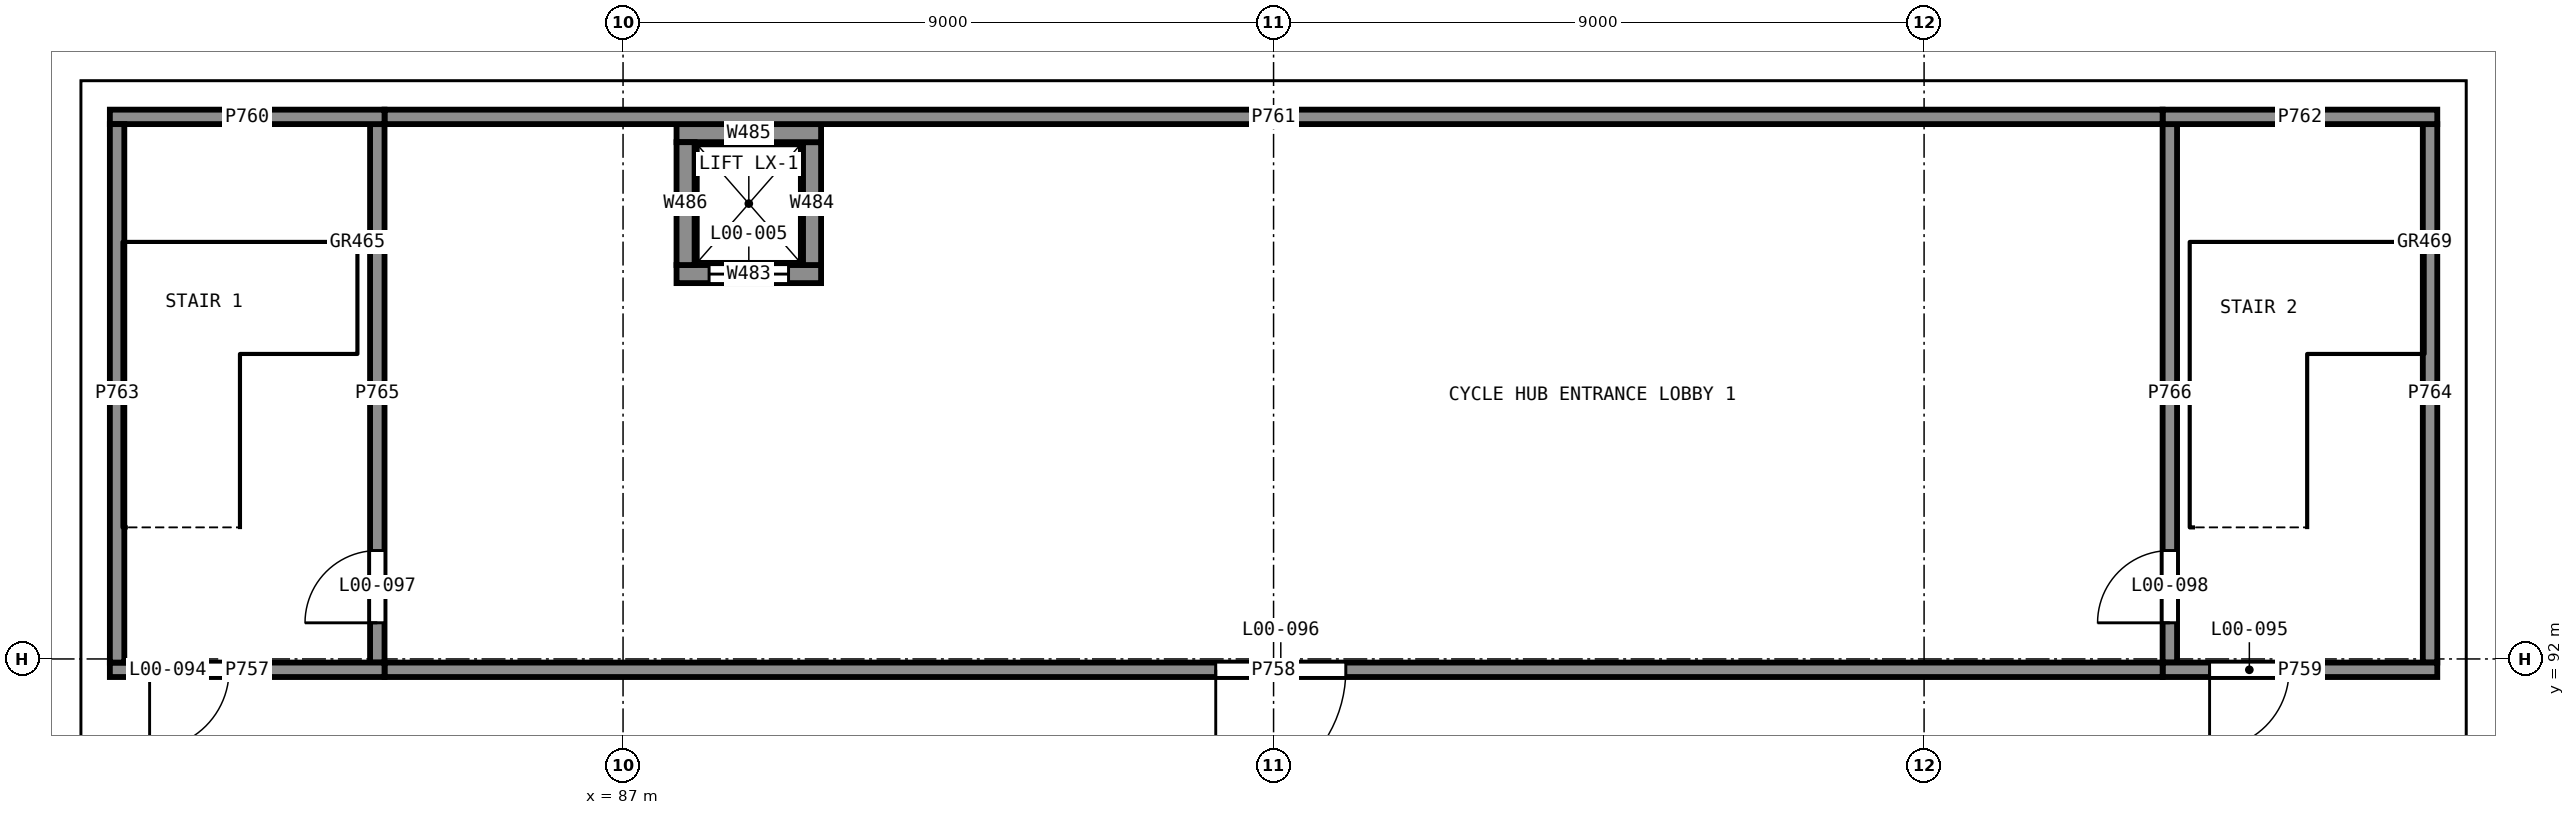
"""IFC4 building model, lengths in metres.
Left out: names, types, materials, properties, quantities, classifications, styles, units other than length and angle.
Written with IfcOpenShell. Run it as: python <this file> out.ifc"""

import sys

from ifc_helpers import new_model, si_unit, direction, frame, frame_2d, origin, place, context, subcontext, project, spatial, rectangle, extrude, element, fill, save


model = new_model("IFC4")
c1 = context("Model", 3, precision=1e-05, world=origin(), true_north=direction((0.0, 1.0)))
c2 = subcontext(c1, "Body", "Model", "MODEL_VIEW")
j1 = project(units=[si_unit("LENGTHUNIT", "METRE"), si_unit("PLANEANGLEUNIT", "RADIAN")], contexts=[c1])
p1 = place(None, origin())
s1 = spatial("IfcSite", under=j1, at=p1, CompositionType="ELEMENT")
p2 = place(p1, origin())
s2 = spatial("IfcBuilding", under=s1, at=p2, CompositionType="ELEMENT")
p3 = place(p2, origin())
s3 = spatial("IfcBuildingStorey", under=s2, at=p3, CompositionType="ELEMENT", Elevation=0.0)
p4 = place(p3, frame((87.74, 97.325, 0.0), z_axis=(0.0, 0.0, 1.0), x_axis=(1.0, 0.0, 0.0)))
e1 = element("IfcWall", 1, at=p4, inside=s3, PredefinedType="SHEAR", context=c2, shape_type="SweptSolid", body=[
    extrude(rectangle(XDim=2.0, YDim=0.25, at=frame_2d((1.0, 0.0))), origin(), (0.0, 0.0, 1.0), 3.8),
])
p5 = place(p4, frame((0.45, 0.0, 0.0)))
e2 = element("IfcOpeningElement", 2, at=p5, cuts=e1, PredefinedType="OPENING", context=c2, shape_type="SweptSolid", body=[
    extrude(rectangle(XDim=1.1, YDim=2.1, at=frame_2d((0.55, 1.05))), frame((0.0, 0.135, 0.0), z_axis=(0.0, -1.0, 0.0), x_axis=(1.0, 0.0, 0.0)), (0.0, 0.0, 1.0), 0.27),
])
p6 = place(p3, frame((89.615, 97.45, 0.0), z_axis=(0.0, 0.0, 1.0), x_axis=(0.0, 1.0, 0.0)))
e3 = element("IfcWall", 3, at=p6, inside=s3, PredefinedType="SHEAR", context=c2, shape_type="SweptSolid", body=[
    extrude(rectangle(XDim=1.7, YDim=0.25, at=frame_2d((0.85, 0.0))), origin(), (0.0, 0.0, 1.0), 3.8),
])
p7 = place(p3, frame((89.74, 99.275, 0.0), z_axis=(0.0, 0.0, 1.0), x_axis=(-1.0, 0.0, 0.0)))
e4 = element("IfcWall", 4, at=p7, inside=s3, PredefinedType="SHEAR", context=c2, shape_type="SweptSolid", body=[
    extrude(rectangle(XDim=2.0, YDim=0.25, at=frame_2d((1.0, 0.0))), origin(), (0.0, 0.0, 1.0), 3.8),
])
p8 = place(p3, frame((87.865, 99.15, 0.0), z_axis=(0.0, 0.0, 1.0), x_axis=(0.0, -1.0, 0.0)))
e5 = element("IfcWall", 5, at=p8, inside=s3, PredefinedType="SHEAR", context=c2, shape_type="SweptSolid", body=[
    extrude(rectangle(XDim=1.7, YDim=0.25, at=frame_2d((0.85, 0.0))), origin(), (0.0, 0.0, 1.0), 3.8),
])
p9 = place(p3, frame((79.9, 91.85, -0.15), z_axis=(0.0, 0.0, 1.0), x_axis=(1.0, 0.0, 0.0)))
e6 = element("IfcWall", 6, at=p9, inside=s3, PredefinedType="SOLIDWALL", context=c2, shape_type="SweptSolid", body=[
    extrude(rectangle(XDim=3.8, YDim=0.2, at=frame_2d((1.9, 0.0))), origin(), (0.0, 0.0, 1.0), 3.95),
])
p10 = place(p9, frame((0.55, 0.0, 0.15)))
e7 = element("IfcOpeningElement", 7, at=p10, cuts=e6, PredefinedType="OPENING", context=c2, shape_type="SweptSolid", body=[
    extrude(rectangle(XDim=1.1, YDim=2.1, at=frame_2d((0.55, 1.05))), frame((0.0, 0.11, 0.0), z_axis=(0.0, -1.0, 0.0), x_axis=(1.0, 0.0, 0.0)), (0.0, 0.0, 1.0), 0.22),
])
p11 = place(p3, frame((83.7, 91.85, -0.15), z_axis=(0.0, 0.0, 1.0), x_axis=(1.0, 0.0, 0.0)))
e8 = element("IfcWall", 8, at=p11, inside=s3, PredefinedType="SOLIDWALL", context=c2, shape_type="SweptSolid", body=[
    extrude(rectangle(XDim=24.6, YDim=0.2, at=frame_2d((12.3, 0.0))), origin(), (0.0, 0.0, 1.0), 3.95),
])
p12 = place(p11, frame((11.5, 0.0, 0.15)))
e9 = element("IfcOpeningElement", 9, at=p12, cuts=e8, PredefinedType="OPENING", context=c2, shape_type="SweptSolid", body=[
    extrude(rectangle(XDim=1.8, YDim=2.1, at=frame_2d((0.9, 1.05))), frame((0.0, 0.11, 0.0), z_axis=(0.0, -1.0, 0.0), x_axis=(1.0, 0.0, 0.0)), (0.0, 0.0, 1.0), 0.22),
])
p13 = place(p3, frame((108.3, 91.85, -0.15), z_axis=(0.0, 0.0, 1.0), x_axis=(1.0, 0.0, 0.0)))
e10 = element("IfcWall", 10, at=p13, inside=s3, PredefinedType="SOLIDWALL", context=c2, shape_type="SweptSolid", body=[
    extrude(rectangle(XDim=3.8, YDim=0.2, at=frame_2d((1.9, 0.0))), origin(), (0.0, 0.0, 1.0), 3.95),
])
p14 = place(p13, frame((0.65, 0.0, 0.15)))
e11 = element("IfcOpeningElement", 11, at=p14, cuts=e10, PredefinedType="OPENING", context=c2, shape_type="SweptSolid", body=[
    extrude(rectangle(XDim=1.1, YDim=2.1, at=frame_2d((0.55, 1.05))), frame((0.0, 0.11, 0.0), z_axis=(0.0, -1.0, 0.0), x_axis=(1.0, 0.0, 0.0)), (0.0, 0.0, 1.0), 0.22),
])
p15 = place(p3, frame((79.9, 99.5, -0.15), z_axis=(0.0, 0.0, 1.0), x_axis=(1.0, 0.0, 0.0)))
e12 = element("IfcWall", 12, at=p15, inside=s3, PredefinedType="SOLIDWALL", context=c2, shape_type="SweptSolid", body=[
    extrude(rectangle(XDim=3.8, YDim=0.2, at=frame_2d((1.9, 0.0))), origin(), (0.0, 0.0, 1.0), 3.95),
])
p16 = place(p3, frame((83.7, 99.5, -0.15), z_axis=(0.0, 0.0, 1.0), x_axis=(1.0, 0.0, 0.0)))
e13 = element("IfcWall", 13, at=p16, inside=s3, PredefinedType="SOLIDWALL", context=c2, shape_type="SweptSolid", body=[
    extrude(rectangle(XDim=24.6, YDim=0.2, at=frame_2d((12.3, 0.0))), origin(), (0.0, 0.0, 1.0), 3.95),
])
p17 = place(p3, frame((108.3, 99.5, -0.15), z_axis=(0.0, 0.0, 1.0), x_axis=(1.0, 0.0, 0.0)))
e14 = element("IfcWall", 14, at=p17, inside=s3, PredefinedType="SOLIDWALL", context=c2, shape_type="SweptSolid", body=[
    extrude(rectangle(XDim=3.8, YDim=0.2, at=frame_2d((1.9, 0.0))), origin(), (0.0, 0.0, 1.0), 3.95),
])
for number, where, z_axis, x_axis in (
    (15, (80.0, 91.95, -0.15), (0.0, 0.0, 1.0), (0.0, 1.0, 0.0)),
    (16, (112.0, 91.95, -0.15), (0.0, 0.0, 1.0), (0.0, 1.0, 0.0)),
):
    element("IfcWall", number, at=place(p3, frame(where, z_axis=z_axis, x_axis=x_axis)), inside=s3, PredefinedType="SOLIDWALL", context=c2, shape_type="SweptSolid", body=[
        extrude(rectangle(XDim=7.45, YDim=0.2, at=frame_2d((3.725, 0.0))), origin(), (0.0, 0.0, 1.0), 3.95),
    ])
p18 = place(p3, frame((83.6, 91.95, -0.15), z_axis=(0.0, 0.0, 1.0), x_axis=(0.0, 1.0, 0.0)))
e17 = element("IfcWall", 17, at=p18, inside=s3, PredefinedType="SOLIDWALL", context=c2, shape_type="SweptSolid", body=[
    extrude(rectangle(XDim=7.45, YDim=0.2, at=frame_2d((3.725, 0.0))), origin(), (0.0, 0.0, 1.0), 3.95),
])
p19 = place(p18, frame((0.55, 0.0, 0.15)))
e18 = element("IfcOpeningElement", 18, at=p19, cuts=e17, PredefinedType="OPENING", context=c2, shape_type="SweptSolid", body=[
    extrude(rectangle(XDim=1.0, YDim=2.1, at=frame_2d((0.5, 1.05))), frame((0.0, 0.11, 0.0), z_axis=(0.0, -1.0, 0.0), x_axis=(1.0, 0.0, 0.0)), (0.0, 0.0, 1.0), 0.22),
])
p20 = place(p3, frame((108.4, 91.95, -0.15), z_axis=(0.0, 0.0, 1.0), x_axis=(0.0, 1.0, 0.0)))
e19 = element("IfcWall", 19, at=p20, inside=s3, PredefinedType="SOLIDWALL", context=c2, shape_type="SweptSolid", body=[
    extrude(rectangle(XDim=7.45, YDim=0.2, at=frame_2d((3.725, 0.0))), origin(), (0.0, 0.0, 1.0), 3.95),
])
p21 = place(p20, frame((0.55, 0.0, 0.15)))
e20 = element("IfcOpeningElement", 20, at=p21, cuts=e19, PredefinedType="OPENING", context=c2, shape_type="SweptSolid", body=[
    extrude(rectangle(XDim=1.0, YDim=2.1, at=frame_2d((0.5, 1.05))), frame((0.0, 0.11, 0.0), z_axis=(0.0, -1.0, 0.0), x_axis=(1.0, 0.0, 0.0)), (0.0, 0.0, 1.0), 0.22),
])
p22 = place(p5, origin())
e21 = element("IfcDoor", 21, at=p22, inside=s3, OperationType="SLIDING_TO_LEFT", PredefinedType="DOOR", context=c2, shape_type="SweptSolid", body=[
    extrude(rectangle(XDim=1.1, YDim=2.1, at=frame_2d((0.55, 1.05))), frame((0.0, 0.025, 0.0), z_axis=(0.0, -1.0, 0.0), x_axis=(1.0, 0.0, 0.0)), (0.0, 0.0, 1.0), 0.05),
])
fill(e2, e21)
p23 = place(p10, frame((1.1, 0.0, 0.0), z_axis=(0.0, 0.0, 1.0), x_axis=(-1.0, 0.0, 0.0)))
e22 = element("IfcDoor", 22, at=p23, inside=s3, OperationType="SINGLE_SWING_LEFT", PredefinedType="DOOR", context=c2, shape_type="SweptSolid", body=[
    extrude(rectangle(XDim=1.1, YDim=2.1, at=frame_2d((0.55, 1.05))), frame((0.0, 0.025, 0.0), z_axis=(0.0, -1.0, 0.0), x_axis=(1.0, 0.0, 0.0)), (0.0, 0.0, 1.0), 0.05),
])
fill(e7, e22)
p24 = place(p14, frame((1.1, 0.0, 0.0), z_axis=(0.0, 0.0, 1.0), x_axis=(-1.0, 0.0, 0.0)))
e23 = element("IfcDoor", 23, at=p24, inside=s3, OperationType="SINGLE_SWING_LEFT", PredefinedType="DOOR", context=c2, shape_type="SweptSolid", body=[
    extrude(rectangle(XDim=1.1, YDim=2.1, at=frame_2d((0.55, 1.05))), frame((0.0, 0.025, 0.0), z_axis=(0.0, -1.0, 0.0), x_axis=(1.0, 0.0, 0.0)), (0.0, 0.0, 1.0), 0.05),
])
fill(e11, e23)
p25 = place(p12, frame((1.8, 0.0, 0.0), z_axis=(0.0, 0.0, 1.0), x_axis=(-1.0, 0.0, 0.0)))
e24 = element("IfcDoor", 24, at=p25, inside=s3, OperationType="DOUBLE_DOOR_SINGLE_SWING", PredefinedType="DOOR", context=c2, shape_type="SweptSolid", body=[
    extrude(rectangle(XDim=1.8, YDim=2.1, at=frame_2d((0.9, 1.05))), frame((0.0, 0.025, 0.0), z_axis=(0.0, -1.0, 0.0), x_axis=(1.0, 0.0, 0.0)), (0.0, 0.0, 1.0), 0.05),
])
fill(e9, e24)
p26 = place(p19, origin())
e25 = element("IfcDoor", 25, at=p26, inside=s3, OperationType="SINGLE_SWING_RIGHT", PredefinedType="DOOR", context=c2, shape_type="SweptSolid", body=[
    extrude(rectangle(XDim=1.0, YDim=2.1, at=frame_2d((0.5, 1.05))), frame((0.0, 0.025, 0.0), z_axis=(0.0, -1.0, 0.0), x_axis=(1.0, 0.0, 0.0)), (0.0, 0.0, 1.0), 0.05),
])
fill(e18, e25)
p27 = place(p21, origin())
e26 = element("IfcDoor", 26, at=p27, inside=s3, OperationType="SINGLE_SWING_RIGHT", PredefinedType="DOOR", context=c2, shape_type="SweptSolid", body=[
    extrude(rectangle(XDim=1.0, YDim=2.1, at=frame_2d((0.5, 1.05))), frame((0.0, 0.025, 0.0), z_axis=(0.0, -1.0, 0.0), x_axis=(1.0, 0.0, 0.0)), (0.0, 0.0, 1.0), 0.05),
])
fill(e20, e26)
save(model, sys.argv[1])
